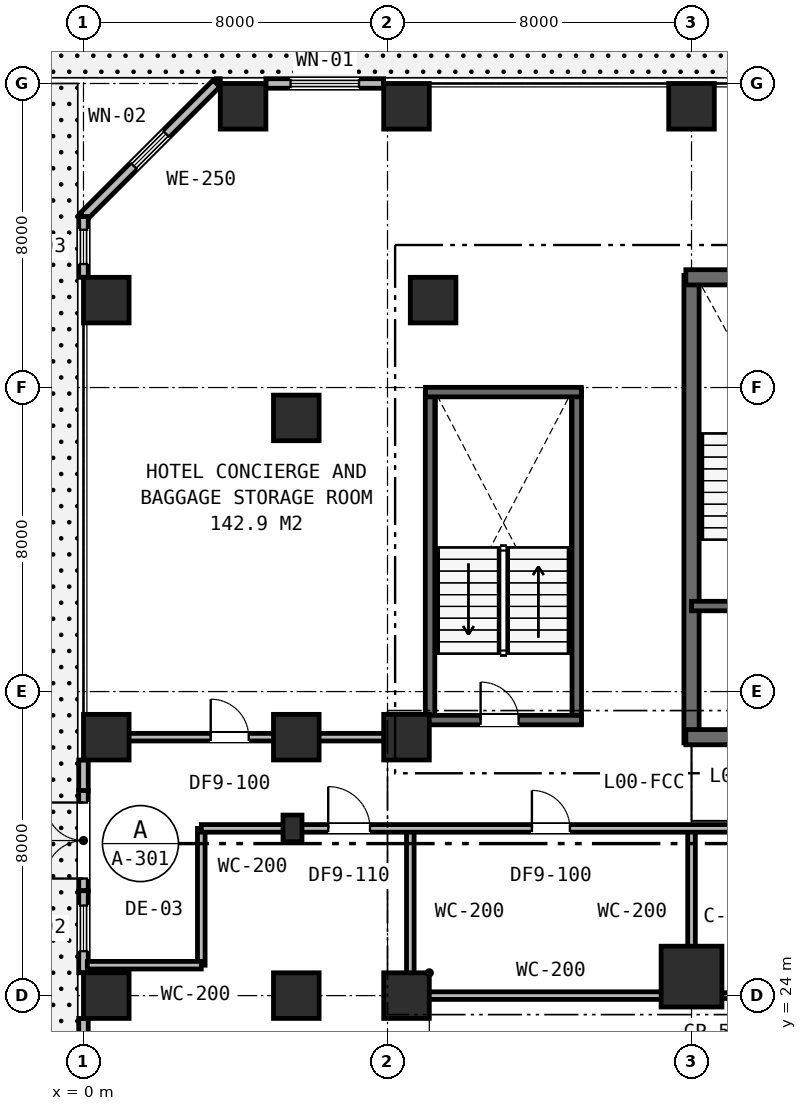
"""IFC4 building model, lengths in metres.
Left out: names, types, materials, properties, quantities, classifications, styles, units other than length and angle.
Written with IfcOpenShell. Run it as: python <this file> out.ifc"""

import sys

from ifc_helpers import new_model, si_unit, direction, frame, frame_2d, origin, origin_2d, place, context, subcontext, project, spatial, rectangle, extrude, element, fill, save


model = new_model("IFC4")
c1 = context("Model", 3, precision=1e-05, world=origin(), true_north=direction((0.0, 1.0)))
c2 = subcontext(c1, "Body", "Model", "MODEL_VIEW")
j1 = project(units=[si_unit("LENGTHUNIT", "METRE"), si_unit("PLANEANGLEUNIT", "RADIAN")], contexts=[c1])
p1 = place(None, origin())
s1 = spatial("IfcSite", under=j1, at=p1, CompositionType="ELEMENT")
p2 = place(p1, origin())
s2 = spatial("IfcBuilding", under=s1, at=p2, CompositionType="ELEMENT")
p3 = place(p2, origin())
s3 = spatial("IfcBuildingStorey", under=s2, at=p3, CompositionType="ELEMENT", Elevation=0.0)
p4 = place(p3, frame((16.0, 30.65, 0.0), z_axis=(0.0, 0.0, 1.0), x_axis=(0.0, 1.0, 0.0)))
e1 = element("IfcWall", 1, at=p4, inside=s3, PredefinedType="SHEAR", context=c2, shape_type="SweptSolid", body=[
    extrude(rectangle(XDim=12.3, YDim=0.4, at=frame_2d((6.15, 0.0))), origin(), (0.0, 0.0, 1.0), 6.0),
])
p5 = place(p3, frame((15.85, 42.9, 0.0), z_axis=(0.0, 0.0, 1.0), x_axis=(1.0, 0.0, 0.0)))
e2 = element("IfcWall", 2, at=p5, inside=s3, PredefinedType="SHEAR", context=c2, shape_type="SweptSolid", body=[
    extrude(rectangle(XDim=24.3, YDim=0.4, at=frame_2d((12.15, 0.0))), origin(), (0.0, 0.0, 1.0), 6.0),
])
p6 = place(p3, frame((15.85, 30.8, 0.0), z_axis=(0.0, 0.0, 1.0), x_axis=(1.0, 0.0, 0.0)))
e3 = element("IfcWall", 3, at=p6, inside=s3, PredefinedType="SHEAR", context=c2, shape_type="SweptSolid", body=[
    extrude(rectangle(XDim=11.2, YDim=0.4, at=frame_2d((5.6, 0.0))), origin(), (0.0, 0.0, 1.0), 6.0),
])
p7 = place(p6, frame((2.45, 0.0, 0.0)))
e4 = element("IfcOpeningElement", 4, at=p7, cuts=e3, PredefinedType="OPENING", context=c2, shape_type="SweptSolid", body=[
    extrude(rectangle(XDim=1.1, YDim=2.15, at=frame_2d((0.55, 1.075))), frame((0.0, 0.21, 0.0), z_axis=(0.0, -1.0, 0.0), x_axis=(1.0, 0.0, 0.0)), (0.0, 0.0, 1.0), 0.42),
])
p8 = place(p3, frame((16.0, 34.25, 0.0), z_axis=(0.0, 0.0, 1.0), x_axis=(1.0, 0.0, 0.0)))
e5 = element("IfcWall", 5, at=p8, inside=s3, PredefinedType="SHEAR", context=c2, shape_type="SweptSolid", body=[
    extrude(rectangle(XDim=6.05, YDim=0.25, at=frame_2d((3.025, 0.0))), origin(), (0.0, 0.0, 1.0), 6.0),
])
p9 = place(p8, frame((1.25, 0.0, 0.0)))
e6 = element("IfcOpeningElement", 6, at=p9, cuts=e5, PredefinedType="OPENING", context=c2, shape_type="SweptSolid", body=[
    extrude(rectangle(XDim=1.0, YDim=2.15, at=frame_2d((0.5, 1.075))), frame((0.0, 0.135, 0.0), z_axis=(0.0, -1.0, 0.0), x_axis=(1.0, 0.0, 0.0)), (0.0, 0.0, 1.0), 0.27),
])
p10 = place(p8, frame((4.2, 0.0, 0.0)))
e7 = element("IfcOpeningElement", 7, at=p10, cuts=e5, PredefinedType="OPENING", context=c2, shape_type="SweptSolid", body=[
    extrude(rectangle(XDim=1.1, YDim=2.15, at=frame_2d((0.55, 1.075))), frame((0.0, 0.135, 0.0), z_axis=(0.0, -1.0, 0.0), x_axis=(1.0, 0.0, 0.0)), (0.0, 0.0, 1.0), 0.27),
])
for number, where, z_axis, x_axis in (
    (8, (9.12, 31.15, 0.0), (0.0, 0.0, 1.0), (0.0, 1.0, 0.0)),
    (9, (12.98, 31.15, 0.0), (0.0, 0.0, 1.0), (0.0, 1.0, 0.0)),
):
    element("IfcWall", number, at=place(p3, frame(where, z_axis=z_axis, x_axis=x_axis)), inside=s3, PredefinedType="SHEAR", context=c2, shape_type="SweptSolid", body=[
        extrude(rectangle(XDim=8.8, YDim=0.25, at=frame_2d((4.4, 0.0))), origin(), (0.0, 0.0, 1.0), 6.0),
    ])
p11 = place(p3, frame((9.0, 39.88, 0.0), z_axis=(0.0, 0.0, 1.0), x_axis=(1.0, 0.0, 0.0)))
e10 = element("IfcWall", 10, at=p11, inside=s3, PredefinedType="SHEAR", context=c2, shape_type="SweptSolid", body=[
    extrude(rectangle(XDim=4.1, YDim=0.25, at=frame_2d((2.05, 0.0))), origin(), (0.0, 0.0, 1.0), 6.0),
])
p12 = place(p3, frame((9.0, 31.25, 0.0), z_axis=(0.0, 0.0, 1.0), x_axis=(1.0, 0.0, 0.0)))
e11 = element("IfcWall", 11, at=p12, inside=s3, PredefinedType="SHEAR", context=c2, shape_type="SweptSolid", body=[
    extrude(rectangle(XDim=4.1, YDim=0.25, at=frame_2d((2.05, 0.0))), origin(), (0.0, 0.0, 1.0), 6.0),
])
p13 = place(p12, frame((1.45, 0.0, 0.0)))
e12 = element("IfcOpeningElement", 12, at=p13, cuts=e11, PredefinedType="OPENING", context=c2, shape_type="SweptSolid", body=[
    extrude(rectangle(XDim=1.0, YDim=2.15, at=frame_2d((0.5, 1.075))), frame((0.0, 0.135, 0.0), z_axis=(0.0, -1.0, 0.0), x_axis=(1.0, 0.0, 0.0)), (0.0, 0.0, 1.0), 0.27),
])
p14 = place(p3, frame((8.5, 24.0, 0.0), z_axis=(0.0, 0.0, 1.0), x_axis=(1.0, 0.0, 0.0)))
e13 = element("IfcColumn", 13, at=p14, inside=s3, PredefinedType="COLUMN", context=c2, shape_type="SweptSolid", body=[
    extrude(rectangle(XDim=1.2, YDim=1.2, at=origin_2d()), origin(), (0.0, 0.0, 1.0), 6.0),
])
p15 = place(p3, frame((16.0, 24.5, 0.0), z_axis=(0.0, 0.0, 1.0), x_axis=(1.0, 0.0, 0.0)))
e14 = element("IfcColumn", 14, at=p15, inside=s3, PredefinedType="COLUMN", context=c2, shape_type="SweptSolid", body=[
    extrude(rectangle(XDim=1.6, YDim=1.6, at=origin_2d()), origin(), (0.0, 0.0, 1.0), 6.0),
])
for number, where, z_axis, x_axis in (
    (15, (5.6, 24.0, 0.0), (0.0, 0.0, 1.0), (1.0, 0.0, 0.0)),
    (16, (5.6, 30.8, 0.0), (0.0, 0.0, 1.0), (1.0, 0.0, 0.0)),
    (17, (5.6, 39.2, 0.0), (0.0, 0.0, 1.0), (1.0, 0.0, 0.0)),
    (18, (8.5, 30.8, 0.0), (0.0, 0.0, 1.0), (1.0, 0.0, 0.0)),
    (19, (9.2, 42.3, 0.0), (0.0, 0.0, 1.0), (1.0, 0.0, 0.0)),
    (20, (0.6, 24.0, 0.0), (0.0, 0.0, 1.0), (1.0, 0.0, 0.0)),
    (21, (0.6, 30.8, 0.0), (0.0, 0.0, 1.0), (1.0, 0.0, 0.0)),
    (22, (0.6, 42.3, 0.0), (0.0, 0.0, 1.0), (1.0, 0.0, 0.0)),
    (23, (4.2, 47.4, 0.0), (0.0, 0.0, 1.0), (1.0, 0.0, 0.0)),
    (24, (8.5, 47.4, 0.0), (0.0, 0.0, 1.0), (1.0, 0.0, 0.0)),
    (25, (16.0, 47.4, 0.0), (0.0, 0.0, 1.0), (1.0, 0.0, 0.0)),
):
    element("IfcColumn", number, at=place(p3, frame(where, z_axis=z_axis, x_axis=x_axis)), inside=s3, PredefinedType="COLUMN", context=c2, shape_type="SweptSolid", body=[
        extrude(rectangle(XDim=1.2, YDim=1.2, at=origin_2d()), origin(), (0.0, 0.0, 1.0), 6.0),
    ])
p16 = place(p3, frame((7.9, 48.0, 0.0), z_axis=(0.0, 0.0, 1.0), x_axis=(-1.0, 0.0, 0.0)))
e26 = element("IfcWall", 26, at=p16, inside=s3, PredefinedType="STANDARD", context=c2, shape_type="SweptSolid", body=[
    extrude(rectangle(XDim=3.1, YDim=0.25, at=frame_2d((1.55, 0.0))), origin(), (0.0, 0.0, 1.0), 5.67),
])
p17 = place(p16, frame((0.65, 0.0, 0.75)))
e27 = element("IfcOpeningElement", 27, at=p17, cuts=e26, PredefinedType="OPENING", context=c2, shape_type="SweptSolid", body=[
    extrude(rectangle(XDim=1.8, YDim=1.85, at=frame_2d((0.9, 0.925))), frame((0.0, 0.135, 0.0), z_axis=(0.0, -1.0, 0.0), x_axis=(1.0, 0.0, 0.0)), (0.0, 0.0, 1.0), 0.27),
])
p18 = place(p3, frame((3.6, 48.0, 0.0), z_axis=(0.0, 0.0, 1.0), x_axis=(-1.0, 0.0, 0.0)))
e28 = element("IfcWall", 28, at=p18, inside=s3, PredefinedType="STANDARD", context=c2, shape_type="SweptSolid", body=[
    extrude(rectangle(XDim=0.1, YDim=0.25, at=frame_2d((0.05, 0.0))), origin(), (0.0, 0.0, 1.0), 5.67),
])
p19 = place(p3, frame((3.5, 48.0, 0.0), z_axis=(0.0, 0.0, 1.0), x_axis=(-0.707106781187, -0.707106781187, 0.0)))
e29 = element("IfcWall", 29, at=p19, inside=s3, PredefinedType="STANDARD", context=c2, shape_type="SweptSolid", body=[
    extrude(rectangle(XDim=4.95, YDim=0.25, at=frame_2d((2.475, 0.0))), origin(), (0.0, 0.0, 1.0), 5.67),
])
p20 = place(p19, frame((1.875, 0.0, 0.85)))
e30 = element("IfcOpeningElement", 30, at=p20, cuts=e29, PredefinedType="OPENING", context=c2, shape_type="SweptSolid", body=[
    extrude(rectangle(XDim=1.2, YDim=1.6, at=frame_2d((0.6, 0.8))), frame((0.0, 0.135, 0.0), z_axis=(0.0, -1.0, 0.0), x_axis=(1.0, 0.0, 0.0)), (0.0, 0.0, 1.0), 0.27),
])
p21 = place(p3, frame((0.0, 26.76, 0.0), z_axis=(0.0, 0.0, 1.0), x_axis=(0.0, 1.0, 0.0)))
e31 = element("IfcWall", 31, at=p21, inside=s3, PredefinedType="STANDARD", context=c2, shape_type="SweptSolid", body=[
    extrude(rectangle(XDim=2.64, YDim=0.25, at=frame_2d((1.32, 0.0))), origin(), (0.0, 0.0, 1.0), 5.67),
])
p22 = place(p21, frame((0.32, 0.0, 0.0)))
e32 = element("IfcOpeningElement", 32, at=p22, cuts=e31, PredefinedType="OPENING", context=c2, shape_type="SweptSolid", body=[
    extrude(rectangle(XDim=2.0, YDim=2.4, at=frame_2d((1.0, 1.2))), frame((0.0, 0.135, 0.0), z_axis=(0.0, -1.0, 0.0), x_axis=(1.0, 0.0, 0.0)), (0.0, 0.0, 1.0), 0.27),
])
p23 = place(p3, frame((0.0, 44.5, 0.0), z_axis=(0.0, 0.0, 1.0), x_axis=(0.0, -1.0, 0.0)))
e33 = element("IfcWall", 33, at=p23, inside=s3, PredefinedType="STANDARD", context=c2, shape_type="SweptSolid", body=[
    extrude(rectangle(XDim=1.6, YDim=0.25, at=frame_2d((0.8, 0.0))), origin(), (0.0, 0.0, 1.0), 5.67),
])
p24 = place(p23, frame((0.35, 0.0, 0.9)))
e34 = element("IfcOpeningElement", 34, at=p24, cuts=e33, PredefinedType="OPENING", context=c2, shape_type="SweptSolid", body=[
    extrude(rectangle(XDim=0.9, YDim=1.55, at=frame_2d((0.45, 0.775))), frame((0.0, 0.135, 0.0), z_axis=(0.0, -1.0, 0.0), x_axis=(1.0, 0.0, 0.0)), (0.0, 0.0, 1.0), 0.27),
])
p25 = place(p3, frame((0.0, 30.2, 0.0), z_axis=(0.0, 0.0, 1.0), x_axis=(0.0, -1.0, 0.0)))
e35 = element("IfcWall", 35, at=p25, inside=s3, PredefinedType="STANDARD", context=c2, shape_type="SweptSolid", body=[
    extrude(rectangle(XDim=0.8, YDim=0.25, at=frame_2d((0.4, 0.0))), origin(), (0.0, 0.0, 1.0), 5.67),
])
p26 = place(p3, frame((0.0, 26.76, 0.0), z_axis=(0.0, 0.0, 1.0), x_axis=(0.0, -1.0, 0.0)))
e36 = element("IfcWall", 36, at=p26, inside=s3, PredefinedType="STANDARD", context=c2, shape_type="SweptSolid", body=[
    extrude(rectangle(XDim=2.16, YDim=0.25, at=frame_2d((1.08, 0.0))), origin(), (0.0, 0.0, 1.0), 5.67),
])
p27 = place(p26, frame((0.39, 0.0, 0.85)))
e37 = element("IfcOpeningElement", 37, at=p27, cuts=e36, PredefinedType="OPENING", context=c2, shape_type="SweptSolid", body=[
    extrude(rectangle(XDim=1.2, YDim=1.6, at=frame_2d((0.6, 0.8))), frame((0.0, 0.135, 0.0), z_axis=(0.0, -1.0, 0.0), x_axis=(1.0, 0.0, 0.0)), (0.0, 0.0, 1.0), 0.27),
])
p28 = place(p3, frame((0.0, 23.4, 0.0), z_axis=(0.0, 0.0, 1.0), x_axis=(0.0, -1.0, 0.0)))
e38 = element("IfcWall", 38, at=p28, inside=s3, PredefinedType="STANDARD", context=c2, shape_type="SweptSolid", body=[
    extrude(rectangle(XDim=4.8, YDim=0.25, at=frame_2d((2.4, 0.0))), origin(), (0.0, 0.0, 1.0), 5.67),
])
p29 = place(p28, frame((1.5, 0.0, 0.75)))
e39 = element("IfcOpeningElement", 39, at=p29, cuts=e38, PredefinedType="OPENING", context=c2, shape_type="SweptSolid", body=[
    extrude(rectangle(XDim=1.8, YDim=1.85, at=frame_2d((0.9, 0.925))), frame((0.0, 0.135, 0.0), z_axis=(0.0, -1.0, 0.0), x_axis=(1.0, 0.0, 0.0)), (0.0, 0.0, 1.0), 0.27),
])
p30 = place(p3, frame((3.1, 24.8, 0.0), z_axis=(0.0, 0.0, 1.0), x_axis=(0.0, 1.0, 0.0)))
e40 = element("IfcWall", 40, at=p30, inside=s3, PredefinedType="PARTITIONING", context=c2, shape_type="SweptSolid", body=[
    extrude(rectangle(XDim=3.6, YDim=0.2, at=frame_2d((1.8, 0.0))), origin(), (0.0, 0.0, 1.0), 5.67),
])
p31 = place(p3, frame((0.1, 24.8, 0.0), z_axis=(0.0, 0.0, 1.0), x_axis=(1.0, 0.0, 0.0)))
e41 = element("IfcWall", 41, at=p31, inside=s3, PredefinedType="PARTITIONING", context=c2, shape_type="SweptSolid", body=[
    extrude(rectangle(XDim=3.0, YDim=0.2, at=frame_2d((1.5, 0.0))), origin(), (0.0, 0.0, 1.0), 5.21),
])
for number, where, z_axis, x_axis in (
    (42, (16.0, 24.0, 0.0), (0.0, 0.0, 1.0), (0.0, 1.0, 0.0)),
    (43, (8.6, 24.0, 0.0), (0.0, 0.0, 1.0), (0.0, 1.0, 0.0)),
):
    element("IfcWall", number, at=place(p3, frame(where, z_axis=z_axis, x_axis=x_axis)), inside=s3, PredefinedType="PARTITIONING", context=c2, shape_type="SweptSolid", body=[
        extrude(rectangle(XDim=4.4, YDim=0.2, at=frame_2d((2.2, 0.0))), origin(), (0.0, 0.0, 1.0), 5.02),
    ])
p32 = place(p3, frame((8.6, 24.0, 0.0), z_axis=(0.0, 0.0, 1.0), x_axis=(1.0, 0.0, 0.0)))
e44 = element("IfcWall", 44, at=p32, inside=s3, PredefinedType="PARTITIONING", context=c2, shape_type="SweptSolid", body=[
    extrude(rectangle(XDim=7.4, YDim=0.2, at=frame_2d((3.7, 0.0))), origin(), (0.0, 0.0, 1.0), 5.02),
])
p33 = place(p3, frame((3.1, 28.4, 0.0), z_axis=(0.0, 0.0, 1.0), x_axis=(1.0, 0.0, 0.0)))
e45 = element("IfcWall", 45, at=p33, inside=s3, PredefinedType="PARTITIONING", context=c2, shape_type="SweptSolid", body=[
    extrude(rectangle(XDim=52.8, YDim=0.2, at=frame_2d((26.4, 0.0))), origin(), (0.0, 0.0, 1.0), 5.02),
])
p34 = place(p33, frame((8.7, 0.0, 0.0)))
e46 = element("IfcOpeningElement", 46, at=p34, cuts=e45, PredefinedType="OPENING", context=c2, shape_type="SweptSolid", body=[
    extrude(rectangle(XDim=1.0, YDim=2.15, at=frame_2d((0.5, 1.075))), frame((0.0, 0.11, 0.0), z_axis=(0.0, -1.0, 0.0), x_axis=(1.0, 0.0, 0.0)), (0.0, 0.0, 1.0), 0.22),
])
p35 = place(p33, frame((23.25, 0.0, 0.0)))
e47 = element("IfcOpeningElement", 47, at=p35, cuts=e45, PredefinedType="OPENING", context=c2, shape_type="SweptSolid", body=[
    extrude(rectangle(XDim=1.1, YDim=2.15, at=frame_2d((0.55, 1.075))), frame((0.0, 0.11, 0.0), z_axis=(0.0, -1.0, 0.0), x_axis=(1.0, 0.0, 0.0)), (0.0, 0.0, 1.0), 0.22),
])
p36 = place(p33, frame((39.702, 0.0, 0.0)))
e48 = element("IfcOpeningElement", 48, at=p36, cuts=e45, PredefinedType="OPENING", context=c2, shape_type="SweptSolid", body=[
    extrude(rectangle(XDim=1.1, YDim=2.15, at=frame_2d((0.55, 1.075))), frame((0.0, 0.11, 0.0), z_axis=(0.0, -1.0, 0.0), x_axis=(1.0, 0.0, 0.0)), (0.0, 0.0, 1.0), 0.22),
])
p37 = place(p33, frame((3.34, 0.0, 0.0)))
e49 = element("IfcOpeningElement", 49, at=p37, cuts=e45, PredefinedType="OPENING", context=c2, shape_type="SweptSolid", body=[
    extrude(rectangle(XDim=1.1, YDim=2.15, at=frame_2d((0.55, 1.075))), frame((0.0, 0.11, 0.0), z_axis=(0.0, -1.0, 0.0), x_axis=(1.0, 0.0, 0.0)), (0.0, 0.0, 1.0), 0.22),
])
p38 = place(p3, frame((16.0, 24.0, 0.0), z_axis=(0.0, 0.0, 1.0), x_axis=(1.0, 0.0, 0.0)))
e50 = element("IfcWall", 50, at=p38, inside=s3, PredefinedType="PARTITIONING", context=c2, shape_type="SweptSolid", body=[
    extrude(rectangle(XDim=7.9, YDim=0.15, at=frame_2d((3.95, 0.0))), origin(), (0.0, 0.0, 1.0), 5.02),
])
p39 = place(p3, frame((0.1, 30.8, 0.0), z_axis=(0.0, 0.0, 1.0), x_axis=(1.0, 0.0, 0.0)))
e51 = element("IfcWall", 51, at=p39, inside=s3, PredefinedType="PARTITIONING", context=c2, shape_type="SweptSolid", body=[
    extrude(rectangle(XDim=8.9, YDim=0.2, at=frame_2d((4.45, 0.0))), origin(), (0.0, 0.0, 1.0), 5.02),
])
p40 = place(p39, frame((3.248, 0.0, 0.0)))
e52 = element("IfcOpeningElement", 52, at=p40, cuts=e51, PredefinedType="OPENING", context=c2, shape_type="SweptSolid", body=[
    extrude(rectangle(XDim=1.0, YDim=2.15, at=frame_2d((0.5, 1.075))), frame((0.0, 0.11, 0.0), z_axis=(0.0, -1.0, 0.0), x_axis=(1.0, 0.0, 0.0)), (0.0, 0.0, 1.0), 0.22),
])
p41 = place(p3, frame((5.5, 28.4, 0.0), z_axis=(0.0, 0.0, 1.0), x_axis=(1.0, 0.0, 0.0)))
e53 = element("IfcColumn", 53, at=p41, inside=s3, PredefinedType="PILASTER", context=c2, shape_type="SweptSolid", body=[
    extrude(rectangle(XDim=0.5, YDim=0.7, at=origin_2d()), origin(), (0.0, 0.0, 1.0), 5.68),
])
p42 = place(p17, origin())
e54 = element("IfcWindow", 54, at=p42, inside=s3, PartitioningType="SINGLE_PANEL", PredefinedType="WINDOW", context=c2, shape_type="SweptSolid", body=[
    extrude(rectangle(XDim=1.8, YDim=1.85, at=frame_2d((0.9, 0.925))), frame((0.0, 0.03, 0.0), z_axis=(0.0, -1.0, 0.0), x_axis=(1.0, 0.0, 0.0)), (0.0, 0.0, 1.0), 0.06),
])
fill(e27, e54)
p43 = place(p20, origin())
e55 = element("IfcWindow", 55, at=p43, inside=s3, PartitioningType="SINGLE_PANEL", PredefinedType="WINDOW", context=c2, shape_type="SweptSolid", body=[
    extrude(rectangle(XDim=1.2, YDim=1.6, at=frame_2d((0.6, 0.8))), frame((0.0, 0.03, 0.0), z_axis=(0.0, -1.0, 0.0), x_axis=(1.0, 0.0, 0.0)), (0.0, 0.0, 1.0), 0.06),
])
fill(e30, e55)
p44 = place(p22, origin())
e56 = element("IfcDoor", 56, at=p44, inside=s3, OperationType="DOUBLE_DOOR_SINGLE_SWING", PredefinedType="DOOR", context=c2, shape_type="SweptSolid", body=[
    extrude(rectangle(XDim=2.0, YDim=2.4, at=frame_2d((1.0, 1.2))), frame((0.0, 0.025, 0.0), z_axis=(0.0, -1.0, 0.0), x_axis=(1.0, 0.0, 0.0)), (0.0, 0.0, 1.0), 0.05),
])
fill(e32, e56)
p45 = place(p24, origin())
e57 = element("IfcWindow", 57, at=p45, inside=s3, PartitioningType="SINGLE_PANEL", PredefinedType="WINDOW", context=c2, shape_type="SweptSolid", body=[
    extrude(rectangle(XDim=0.9, YDim=1.55, at=frame_2d((0.45, 0.775))), frame((0.0, 0.03, 0.0), z_axis=(0.0, -1.0, 0.0), x_axis=(1.0, 0.0, 0.0)), (0.0, 0.0, 1.0), 0.06),
])
fill(e34, e57)
p46 = place(p27, origin())
e58 = element("IfcWindow", 58, at=p46, inside=s3, PartitioningType="SINGLE_PANEL", PredefinedType="WINDOW", context=c2, shape_type="SweptSolid", body=[
    extrude(rectangle(XDim=1.2, YDim=1.6, at=frame_2d((0.6, 0.8))), frame((0.0, 0.03, 0.0), z_axis=(0.0, -1.0, 0.0), x_axis=(1.0, 0.0, 0.0)), (0.0, 0.0, 1.0), 0.06),
])
fill(e37, e58)
p47 = place(p13, origin())
e59 = element("IfcDoor", 59, at=p47, inside=s3, OperationType="SINGLE_SWING_LEFT", PredefinedType="DOOR", context=c2, shape_type="SweptSolid", body=[
    extrude(rectangle(XDim=1.0, YDim=2.15, at=frame_2d((0.5, 1.075))), frame((0.0, 0.025, 0.0), z_axis=(0.0, -1.0, 0.0), x_axis=(1.0, 0.0, 0.0)), (0.0, 0.0, 1.0), 0.05),
])
fill(e12, e59)
p48 = place(p34, origin())
e60 = element("IfcDoor", 60, at=p48, inside=s3, OperationType="SINGLE_SWING_LEFT", PredefinedType="DOOR", context=c2, shape_type="SweptSolid", body=[
    extrude(rectangle(XDim=1.0, YDim=2.15, at=frame_2d((0.5, 1.075))), frame((0.0, 0.025, 0.0), z_axis=(0.0, -1.0, 0.0), x_axis=(1.0, 0.0, 0.0)), (0.0, 0.0, 1.0), 0.05),
])
fill(e46, e60)
p49 = place(p37, origin())
e61 = element("IfcDoor", 61, at=p49, inside=s3, OperationType="SINGLE_SWING_LEFT", PredefinedType="DOOR", context=c2, shape_type="SweptSolid", body=[
    extrude(rectangle(XDim=1.1, YDim=2.15, at=frame_2d((0.55, 1.075))), frame((0.0, 0.025, 0.0), z_axis=(0.0, -1.0, 0.0), x_axis=(1.0, 0.0, 0.0)), (0.0, 0.0, 1.0), 0.05),
])
fill(e49, e61)
p50 = place(p40, origin())
e62 = element("IfcDoor", 62, at=p50, inside=s3, OperationType="SINGLE_SWING_LEFT", PredefinedType="DOOR", context=c2, shape_type="SweptSolid", body=[
    extrude(rectangle(XDim=1.0, YDim=2.15, at=frame_2d((0.5, 1.075))), frame((0.0, 0.025, 0.0), z_axis=(0.0, -1.0, 0.0), x_axis=(1.0, 0.0, 0.0)), (0.0, 0.0, 1.0), 0.05),
])
fill(e52, e62)
save(model, sys.argv[1])
